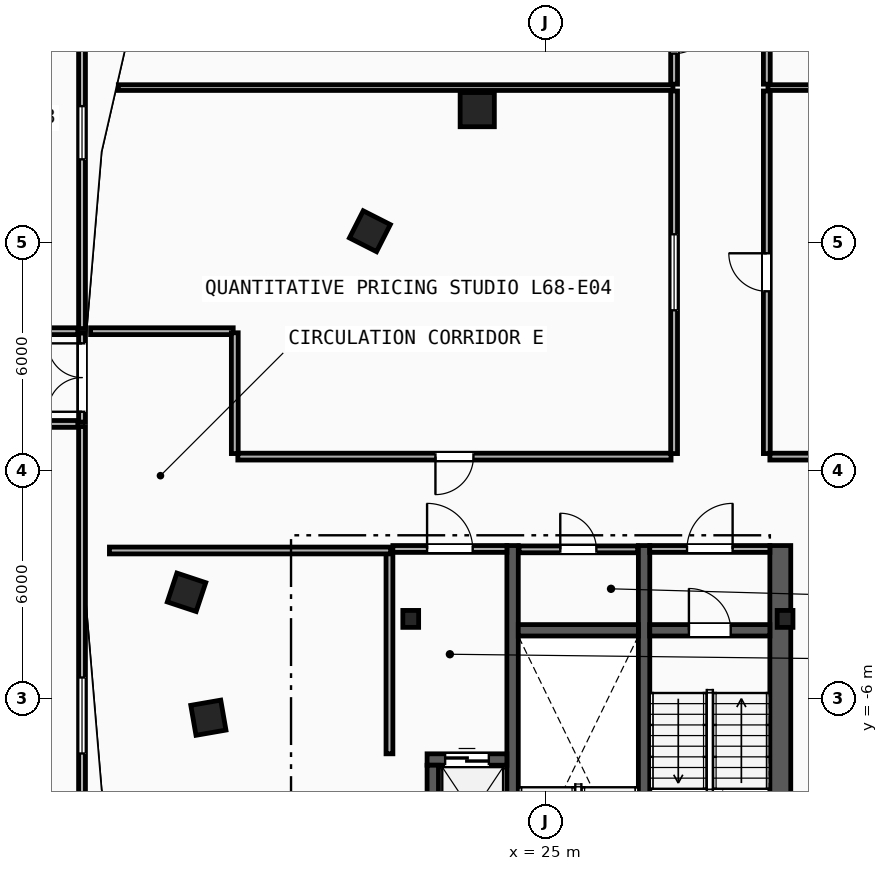
"""IFC4 building model, lengths in metres.
Left out: names, types, materials, properties, quantities, classifications, styles, units other than length and angle.
Written with IfcOpenShell. Run it as: python <this file> out.ifc"""

import sys

from ifc_helpers import new_model, si_unit, direction, frame, frame_2d, origin, origin_2d, place, context, subcontext, project, spatial, rectangle, i_section, extrude, element, fill, save


model = new_model("IFC4")
c1 = context("Model", 3, precision=1e-05, world=origin(), true_north=direction((0.0, 1.0)))
c2 = subcontext(c1, "Body", "Model", "MODEL_VIEW")
j1 = project(units=[si_unit("LENGTHUNIT", "METRE"), si_unit("PLANEANGLEUNIT", "RADIAN")], contexts=[c1])
p1 = place(None, origin())
s1 = spatial("IfcSite", under=j1, at=p1, CompositionType="ELEMENT")
p2 = place(p1, origin())
s2 = spatial("IfcBuilding", under=s1, at=p2, CompositionType="ELEMENT")
p3 = place(p2, frame((0.0, 0.0, 257.6)))
s3 = spatial("IfcBuildingStorey", under=s2, at=p3, CompositionType="ELEMENT", Elevation=257.6)
for number, where, z_axis, x_axis in (
    (1, (31.3, -3.9, 0.0), (0.0, 0.0, 1.0), (1.0, 0.0, 0.0)),
    (2, (21.45, -3.9, 0.0), (0.0, 0.0, 1.0), (1.0, 0.0, 0.0)),
):
    element("IfcColumn", number, at=place(p3, frame(where, z_axis=z_axis, x_axis=x_axis)), inside=s3, PredefinedType="COLUMN", context=c2, shape_type="SweptSolid", body=[
        extrude(i_section(OverallWidth=0.416, OverallDepth=0.446, WebThickness=0.039, FlangeThickness=0.063, FilletRadius=0.018, at=origin_2d()), origin(), (0.0, 0.0, 1.0), 3.6),
    ])
p4 = place(p3, frame((23.2, 9.5, 0.0), z_axis=(0.0, 0.0, 1.0), x_axis=(1.0, 0.0, 0.0)))
e3 = element("IfcColumn", 3, at=p4, inside=s3, PredefinedType="COLUMN", context=c2, shape_type="SweptSolid", body=[
    extrude(rectangle(XDim=0.9, YDim=0.9, at=origin_2d()), origin(), (0.0, 0.0, 1.0), 3.6),
])
for number, where, z_axis, x_axis in (
    (4, (15.55, -3.2, 0.0), (0.0, 0.0, 1.0), (-0.315, -0.949, 0.0)),
    (5, (16.125, -6.5, 0.0), (0.0, 0.0, 1.0), (0.172, -0.985, 0.0)),
    (6, (20.375, 6.3, 0.0), (0.0, 0.0, 1.0), (-0.453, -0.892, 0.0)),
):
    element("IfcColumn", number, at=place(p3, frame(where, z_axis=z_axis, x_axis=x_axis)), inside=s3, PredefinedType="COLUMN", context=c2, shape_type="SweptSolid", body=[
        extrude(rectangle(XDim=0.8, YDim=0.8, at=origin_2d()), origin(), (0.0, 0.0, 1.0), 3.6),
    ])
p5 = place(p3, frame((31.175, -15.3, 0.0), z_axis=(0.0, 0.0, 1.0), x_axis=(0.0, 1.0, 0.0)))
e7 = element("IfcWall", 7, at=p5, inside=s3, PredefinedType="SHEAR", context=c2, shape_type="SweptSolid", body=[
    extrude(rectangle(XDim=13.33, YDim=0.55, at=frame_2d((6.665, 0.0))), origin(), (0.0, 0.0, 1.0), 3.34),
])
for number, where, z_axis, x_axis in (
    (8, (27.59, -12.65, 0.0), (0.0, 0.0, 1.0), (0.0, 1.0, 0.0)),
    (9, (24.13, -12.65, 0.0), (0.0, 0.0, 1.0), (0.0, 1.0, 0.0)),
):
    element("IfcWall", number, at=place(p3, frame(where, z_axis=z_axis, x_axis=x_axis)), inside=s3, PredefinedType="SHEAR", context=c2, shape_type="SweptSolid", body=[
        extrude(rectangle(XDim=10.68, YDim=0.3, at=frame_2d((5.34, 0.0))), origin(), (0.0, 0.0, 1.0), 3.34),
    ])
p6 = place(p3, frame((27.74, -4.2, 0.0), z_axis=(0.0, 0.0, 1.0), x_axis=(1.0, 0.0, 0.0)))
e10 = element("IfcWall", 10, at=p6, inside=s3, PredefinedType="SHEAR", context=c2, shape_type="SweptSolid", body=[
    extrude(rectangle(XDim=3.16, YDim=0.3, at=frame_2d((1.58, 0.0))), origin(), (0.0, 0.0, 1.0), 3.34),
])
p7 = place(p6, frame((1.03, 0.0, 0.0)))
e11 = element("IfcOpeningElement", 11, at=p7, cuts=e10, PredefinedType="OPENING", context=c2, shape_type="SweptSolid", body=[
    extrude(rectangle(XDim=1.1, YDim=2.15, at=frame_2d((0.55, 1.075))), frame((0.0, 0.16, 0.0), z_axis=(0.0, -1.0, 0.0), x_axis=(1.0, 0.0, 0.0)), (0.0, 0.0, 1.0), 0.32),
])
p8 = place(p3, frame((24.28, -4.2, 0.0), z_axis=(0.0, 0.0, 1.0), x_axis=(1.0, 0.0, 0.0)))
e12 = element("IfcWall", 12, at=p8, inside=s3, PredefinedType="SHEAR", context=c2, shape_type="SweptSolid", body=[
    extrude(rectangle(XDim=3.16, YDim=0.3, at=frame_2d((1.58, 0.0))), origin(), (0.0, 0.0, 1.0), 3.34),
])
p9 = place(p3, frame((20.89, -7.45, 0.0), z_axis=(0.0, 0.0, 1.0), x_axis=(0.0, 1.0, 0.0)))
e13 = element("IfcWall", 13, at=p9, inside=s3, PredefinedType="PARTITIONING", context=c2, shape_type="SweptSolid", body=[
    extrude(rectangle(XDim=5.3, YDim=0.18, at=frame_2d((2.65, 0.0))), origin(), (0.0, 0.0, 1.0), 3.34),
])
p10 = place(p3, frame((20.98, -2.06, 0.0), z_axis=(0.0, 0.0, 1.0), x_axis=(1.0, 0.0, 0.0)))
e14 = element("IfcWall", 14, at=p10, inside=s3, PredefinedType="PARTITIONING", context=c2, shape_type="SweptSolid", body=[
    extrude(rectangle(XDim=3.0, YDim=0.18, at=frame_2d((1.5, 0.0))), origin(), (0.0, 0.0, 1.0), 3.34),
])
p11 = place(p10, frame((0.9, 0.0, 0.0)))
e15 = element("IfcOpeningElement", 15, at=p11, cuts=e14, PredefinedType="OPENING", context=c2, shape_type="SweptSolid", body=[
    extrude(rectangle(XDim=1.2, YDim=2.15, at=frame_2d((0.6, 1.075))), frame((0.0, 0.1, 0.0), z_axis=(0.0, -1.0, 0.0), x_axis=(1.0, 0.0, 0.0)), (0.0, 0.0, 1.0), 0.2),
])
p12 = place(p3, frame((27.74, -2.06, 0.0), z_axis=(0.0, 0.0, 1.0), x_axis=(1.0, 0.0, 0.0)))
e16 = element("IfcWall", 16, at=p12, inside=s3, PredefinedType="PARTITIONING", context=c2, shape_type="SweptSolid", body=[
    extrude(rectangle(XDim=3.16, YDim=0.18, at=frame_2d((1.58, 0.0))), origin(), (0.0, 0.0, 1.0), 3.34),
])
p13 = place(p12, frame((0.98, 0.0, 0.0)))
e17 = element("IfcOpeningElement", 17, at=p13, cuts=e16, PredefinedType="OPENING", context=c2, shape_type="SweptSolid", body=[
    extrude(rectangle(XDim=1.2, YDim=2.15, at=frame_2d((0.6, 1.075))), frame((0.0, 0.1, 0.0), z_axis=(0.0, -1.0, 0.0), x_axis=(1.0, 0.0, 0.0)), (0.0, 0.0, 1.0), 0.2),
])
p14 = place(p3, frame((21.88, -7.6, 0.0), z_axis=(0.0, 0.0, 1.0), x_axis=(1.0, 0.0, 0.0)))
e18 = element("IfcWall", 18, at=p14, inside=s3, PredefinedType="SHEAR", context=c2, shape_type="SweptSolid", body=[
    extrude(rectangle(XDim=2.1, YDim=0.3, at=frame_2d((1.05, 0.0))), origin(), (0.0, 0.0, 1.0), 3.34),
])
p15 = place(p14, frame((0.475, 0.0, 0.0)))
e19 = element("IfcOpeningElement", 19, at=p15, cuts=e18, PredefinedType="OPENING", context=c2, shape_type="SweptSolid", body=[
    extrude(rectangle(XDim=1.15, YDim=2.2, at=frame_2d((0.575, 1.1))), frame((0.0, 0.16, 0.0), z_axis=(0.0, -1.0, 0.0), x_axis=(1.0, 0.0, 0.0)), (0.0, 0.0, 1.0), 0.32),
])
p16 = place(p3, frame((22.03, -10.25, 0.0), z_axis=(0.0, 0.0, 1.0), x_axis=(0.0, 1.0, 0.0)))
e20 = element("IfcWall", 20, at=p16, inside=s3, PredefinedType="SHEAR", context=c2, shape_type="SweptSolid", body=[
    extrude(rectangle(XDim=2.5, YDim=0.3, at=frame_2d((1.25, 0.0))), origin(), (0.0, 0.0, 1.0), 3.34),
])
p17 = place(p3, frame((24.3, -2.07, 0.0), z_axis=(0.0, 0.0, 1.0), x_axis=(1.0, 0.0, 0.0)))
e21 = element("IfcWall", 21, at=p17, inside=s3, PredefinedType="PARTITIONING", context=c2, shape_type="SweptSolid", body=[
    extrude(rectangle(XDim=3.12, YDim=0.18, at=frame_2d((1.56, 0.0))), origin(), (0.0, 0.0, 1.0), 3.34),
])
p18 = place(p17, frame((1.085, 0.0, 0.0)))
e22 = element("IfcOpeningElement", 22, at=p18, cuts=e21, PredefinedType="OPENING", context=c2, shape_type="SweptSolid", body=[
    extrude(rectangle(XDim=0.95, YDim=2.1, at=frame_2d((0.475, 1.05))), frame((0.0, 0.1, 0.0), z_axis=(0.0, -1.0, 0.0), x_axis=(1.0, 0.0, 0.0)), (0.0, 0.0, 1.0), 0.2),
])
p19 = place(p3, frame((13.755, 10.08, 0.0), z_axis=(0.0, 0.0, 1.0), x_axis=(1.0, 0.0, 0.0)))
e23 = element("IfcWall", 23, at=p19, inside=s3, PredefinedType="PARTITIONING", context=c2, shape_type="SweptSolid", body=[
    extrude(rectangle(XDim=14.595, YDim=0.15, at=frame_2d((7.297, 0.0))), origin(), (0.0, 0.0, 1.0), 2.724),
])
p20 = place(p3, frame((30.85, 10.08, 0.0), z_axis=(0.0, 0.0, 1.0), x_axis=(1.0, 0.0, 0.0)))
e24 = element("IfcWall", 24, at=p20, inside=s3, PredefinedType="PARTITIONING", context=c2, shape_type="SweptSolid", body=[
    extrude(rectangle(XDim=19.395, YDim=0.15, at=frame_2d((9.697, 0.0))), origin(), (0.0, 0.0, 1.0), 2.724),
])
p21 = place(p3, frame((13.521, -2.1, 0.0), z_axis=(0.0, 0.0, 1.0), x_axis=(1.0, 0.0, 0.0)))
e25 = element("IfcWall", 25, at=p21, inside=s3, PredefinedType="PARTITIONING", context=c2, shape_type="SweptSolid", body=[
    extrude(rectangle(XDim=7.398, YDim=0.18, at=frame_2d((3.699, 0.0))), origin(), (0.0, 0.0, 1.0), 3.34),
])
p22 = place(p3, frame((30.82, 0.45, 0.0), z_axis=(0.0, 0.0, 1.0), x_axis=(0.0, 1.0, 0.0)))
e26 = element("IfcWall", 26, at=p22, inside=s3, PredefinedType="PARTITIONING", context=c2, shape_type="SweptSolid", body=[
    extrude(rectangle(XDim=9.54, YDim=0.18, at=frame_2d((4.77, 0.0))), origin(), (0.0, 0.0, 1.0), 3.34),
])
p23 = place(p22, frame((4.27, 0.0, 0.0)))
e27 = element("IfcOpeningElement", 27, at=p23, cuts=e26, PredefinedType="OPENING", context=c2, shape_type="SweptSolid", body=[
    extrude(rectangle(XDim=1.0, YDim=2.15, at=frame_2d((0.5, 1.075))), frame((0.0, 0.1, 0.0), z_axis=(0.0, -1.0, 0.0), x_axis=(1.0, 0.0, 0.0)), (0.0, 0.0, 1.0), 0.2),
])
p24 = place(p3, frame((33.628, 0.37, 0.0), z_axis=(0.0, 0.0, 1.0), x_axis=(-1.0, 0.0, 0.0)))
e28 = element("IfcWall", 28, at=p24, inside=s3, PredefinedType="PARTITIONING", context=c2, shape_type="SweptSolid", body=[
    extrude(rectangle(XDim=2.729, YDim=0.18, at=frame_2d((1.364, 0.0))), origin(), (0.0, 0.0, 1.0), 3.34),
])
p25 = place(p3, frame((28.3, 0.37, 0.0), z_axis=(0.0, 0.0, 1.0), x_axis=(-1.0, 0.0, 0.0)))
e29 = element("IfcWall", 29, at=p25, inside=s3, PredefinedType="PARTITIONING", context=c2, shape_type="SweptSolid", body=[
    extrude(rectangle(XDim=11.4, YDim=0.18, at=frame_2d((5.7, 0.0))), origin(), (0.0, 0.0, 1.0), 3.34),
])
p26 = place(p25, frame((5.2, 0.0, 0.0)))
e30 = element("IfcOpeningElement", 30, at=p26, cuts=e29, PredefinedType="OPENING", context=c2, shape_type="SweptSolid", body=[
    extrude(rectangle(XDim=1.0, YDim=2.15, at=frame_2d((0.5, 1.075))), frame((0.0, 0.1, 0.0), z_axis=(0.0, -1.0, 0.0), x_axis=(1.0, 0.0, 0.0)), (0.0, 0.0, 1.0), 0.2),
])
p27 = place(p3, frame((28.38, 9.99, 0.0), z_axis=(0.0, 0.0, 1.0), x_axis=(0.0, -1.0, 0.0)))
e31 = element("IfcWall", 31, at=p27, inside=s3, PredefinedType="PARTITIONING", context=c2, shape_type="SweptSolid", body=[
    extrude(rectangle(XDim=9.54, YDim=0.18, at=frame_2d((4.77, 0.0))), origin(), (0.0, 0.0, 1.0), 3.34),
])
p28 = place(p27, frame((3.77, 0.0, 1.05)))
e32 = element("IfcOpeningElement", 32, at=p28, cuts=e31, PredefinedType="OPENING", context=c2, shape_type="SweptSolid", body=[
    extrude(rectangle(XDim=2.0, YDim=1.5, at=frame_2d((1.0, 0.75))), frame((0.0, 0.1, 0.0), z_axis=(0.0, -1.0, 0.0), x_axis=(1.0, 0.0, 0.0)), (0.0, 0.0, 1.0), 0.2),
])
p29 = place(p3, frame((16.779, 3.67, 0.0), z_axis=(0.0, 0.0, 1.0), x_axis=(-1.0, 0.0, 0.0)))
e33 = element("IfcWall", 33, at=p29, inside=s3, PredefinedType="PARTITIONING", context=c2, shape_type="SweptSolid", body=[
    extrude(rectangle(XDim=3.753, YDim=0.18, at=frame_2d((1.876, 0.0))), origin(), (0.0, 0.0, 1.0), 3.34),
])
p30 = place(p3, frame((16.82, 0.45, 0.0), z_axis=(0.0, 0.0, 1.0), x_axis=(0.0, 1.0, 0.0)))
e34 = element("IfcWall", 34, at=p30, inside=s3, PredefinedType="PARTITIONING", context=c2, shape_type="SweptSolid", body=[
    extrude(rectangle(XDim=3.178, YDim=0.18, at=frame_2d((1.589, 0.0))), origin(), (0.0, 0.0, 1.0), 3.34),
])
p31 = place(p3, frame((28.38, 12.779, 0.0), z_axis=(0.0, 0.0, 1.0), x_axis=(0.0, -1.0, 0.0)))
e35 = element("IfcWall", 35, at=p31, inside=s3, PredefinedType="PARTITIONING", context=c2, shape_type="SweptSolid", body=[
    extrude(rectangle(XDim=2.609, YDim=0.18, at=frame_2d((1.304, 0.0))), origin(), (0.0, 0.0, 1.0), 3.34),
])
p32 = place(p31, frame((0.804, 0.0, 0.0)))
e36 = element("IfcOpeningElement", 36, at=p32, cuts=e35, PredefinedType="OPENING", context=c2, shape_type="SweptSolid", body=[
    extrude(rectangle(XDim=1.0, YDim=2.15, at=frame_2d((0.5, 1.075))), frame((0.0, 0.1, 0.0), z_axis=(0.0, -1.0, 0.0), x_axis=(1.0, 0.0, 0.0)), (0.0, 0.0, 1.0), 0.2),
])
p33 = place(p3, frame((30.82, 10.17, 0.0), z_axis=(0.0, 0.0, 1.0), x_axis=(0.0, 1.0, 0.0)))
e37 = element("IfcWall", 37, at=p33, inside=s3, PredefinedType="PARTITIONING", context=c2, shape_type="SweptSolid", body=[
    extrude(rectangle(XDim=2.609, YDim=0.18, at=frame_2d((1.304, 0.0))), origin(), (0.0, 0.0, 1.0), 3.34),
])
p34 = place(p3, frame((3.895, 1.23, 0.0), z_axis=(0.0, 0.0, 1.0), x_axis=(1.0, 0.0, 0.0)))
e38 = element("IfcWall", 38, at=p34, inside=s3, PredefinedType="PARTITIONING", context=c2, shape_type="SweptSolid", body=[
    extrude(rectangle(XDim=8.793, YDim=0.18, at=frame_2d((4.397, 0.0))), origin(), (0.0, 0.0, 1.0), 3.34),
])
p35 = place(p34, frame((3.597, 0.0, 0.0)))
e39 = element("IfcOpeningElement", 39, at=p35, cuts=e38, PredefinedType="OPENING", context=c2, shape_type="SweptSolid", body=[
    extrude(rectangle(XDim=1.6, YDim=2.2, at=frame_2d((0.8, 1.1))), frame((0.0, 0.1, 0.0), z_axis=(0.0, -1.0, 0.0), x_axis=(1.0, 0.0, 0.0)), (0.0, 0.0, 1.0), 0.2),
])
p36 = place(p3, frame((12.688, 3.67, 0.0), z_axis=(0.0, 0.0, 1.0), x_axis=(-1.0, 0.0, 0.0)))
e40 = element("IfcWall", 40, at=p36, inside=s3, PredefinedType="PARTITIONING", context=c2, shape_type="SweptSolid", body=[
    extrude(rectangle(XDim=8.793, YDim=0.18, at=frame_2d((4.397, 0.0))), origin(), (0.0, 0.0, 1.0), 3.34),
])
p37 = place(p36, frame((3.597, 0.0, 0.0)))
e41 = element("IfcOpeningElement", 41, at=p37, cuts=e40, PredefinedType="OPENING", context=c2, shape_type="SweptSolid", body=[
    extrude(rectangle(XDim=1.6, YDim=2.2, at=frame_2d((0.8, 1.1))), frame((0.0, 0.1, 0.0), z_axis=(0.0, -1.0, 0.0), x_axis=(1.0, 0.0, 0.0)), (0.0, 0.0, 1.0), 0.2),
])
p38 = place(p3, frame((12.8, -14.044, 0.0), z_axis=(0.0, 0.0, 1.0), x_axis=(0.0, 1.0, 0.0)))
e42 = element("IfcWall", 42, at=p38, inside=s3, PredefinedType="PARTITIONING", context=c2, shape_type="SweptSolid", body=[
    extrude(rectangle(XDim=15.204, YDim=0.18, at=frame_2d((7.602, 0.0))), origin(), (0.0, 0.0, 1.0), 3.34),
])
p39 = place(p38, frame((6.602, 0.0, 1.05)))
e43 = element("IfcOpeningElement", 43, at=p39, cuts=e42, PredefinedType="OPENING", context=c2, shape_type="SweptSolid", body=[
    extrude(rectangle(XDim=2.0, YDim=1.5, at=frame_2d((1.0, 0.75))), frame((0.0, 0.1, 0.0), z_axis=(0.0, -1.0, 0.0), x_axis=(1.0, 0.0, 0.0)), (0.0, 0.0, 1.0), 0.2),
])
p40 = place(p3, frame((12.8, 3.74, 0.0), z_axis=(0.0, 0.0, 1.0), x_axis=(0.0, 1.0, 0.0)))
e44 = element("IfcWall", 44, at=p40, inside=s3, PredefinedType="PARTITIONING", context=c2, shape_type="SweptSolid", body=[
    extrude(rectangle(XDim=10.304, YDim=0.18, at=frame_2d((5.152, 0.0))), origin(), (0.0, 0.0, 1.0), 3.34),
])
p41 = place(p40, frame((4.452, 0.0, 1.05)))
e45 = element("IfcOpeningElement", 45, at=p41, cuts=e44, PredefinedType="OPENING", context=c2, shape_type="SweptSolid", body=[
    extrude(rectangle(XDim=1.4, YDim=1.5, at=frame_2d((0.7, 0.75))), frame((0.0, 0.1, 0.0), z_axis=(0.0, -1.0, 0.0), x_axis=(1.0, 0.0, 0.0)), (0.0, 0.0, 1.0), 0.2),
])
p42 = place(p3, frame((12.8, 1.28, 0.0), z_axis=(0.0, 0.0, 1.0), x_axis=(0.0, 1.0, 0.0)))
e46 = element("IfcWall", 46, at=p42, inside=s3, PredefinedType="PARTITIONING", context=c2, shape_type="SweptSolid", body=[
    extrude(rectangle(XDim=2.34, YDim=0.18, at=frame_2d((1.17, 0.0))), origin(), (0.0, 0.0, 1.0), 3.34),
])
p43 = place(p42, frame((0.27, 0.0, 0.0)))
e47 = element("IfcOpeningElement", 47, at=p43, cuts=e46, PredefinedType="OPENING", context=c2, shape_type="SweptSolid", body=[
    extrude(rectangle(XDim=1.8, YDim=2.25, at=frame_2d((0.9, 1.125))), frame((0.0, 0.1, 0.0), z_axis=(0.0, -1.0, 0.0), x_axis=(1.0, 0.0, 0.0)), (0.0, 0.0, 1.0), 0.2),
])
p44 = place(p7, origin())
e48 = element("IfcDoor", 48, at=p44, inside=s3, OperationType="SINGLE_SWING_LEFT", PredefinedType="DOOR", context=c2, shape_type="SweptSolid", body=[
    extrude(rectangle(XDim=1.1, YDim=2.15, at=frame_2d((0.55, 1.075))), frame((0.0, 0.025, 0.0), z_axis=(0.0, -1.0, 0.0), x_axis=(1.0, 0.0, 0.0)), (0.0, 0.0, 1.0), 0.05),
])
fill(e11, e48)
p45 = place(p11, origin())
e49 = element("IfcDoor", 49, at=p45, inside=s3, OperationType="SINGLE_SWING_LEFT", PredefinedType="DOOR", context=c2, shape_type="SweptSolid", body=[
    extrude(rectangle(XDim=1.2, YDim=2.15, at=frame_2d((0.6, 1.075))), frame((0.0, 0.025, 0.0), z_axis=(0.0, -1.0, 0.0), x_axis=(1.0, 0.0, 0.0)), (0.0, 0.0, 1.0), 0.05),
])
fill(e15, e49)
p46 = place(p13, origin())
e50 = element("IfcDoor", 50, at=p46, inside=s3, OperationType="SINGLE_SWING_RIGHT", PredefinedType="DOOR", context=c2, shape_type="SweptSolid", body=[
    extrude(rectangle(XDim=1.2, YDim=2.15, at=frame_2d((0.6, 1.075))), frame((0.0, 0.025, 0.0), z_axis=(0.0, -1.0, 0.0), x_axis=(1.0, 0.0, 0.0)), (0.0, 0.0, 1.0), 0.05),
])
fill(e17, e50)
p47 = place(p15, origin())
e51 = element("IfcDoor", 51, at=p47, inside=s3, OperationType="SLIDING_TO_LEFT", PredefinedType="TRAPDOOR", context=c2, shape_type="SweptSolid", body=[
    extrude(rectangle(XDim=1.15, YDim=2.2, at=frame_2d((0.575, 1.1))), frame((0.0, 0.025, 0.0), z_axis=(0.0, -1.0, 0.0), x_axis=(1.0, 0.0, 0.0)), (0.0, 0.0, 1.0), 0.05),
])
fill(e19, e51)
p48 = place(p26, origin())
e52 = element("IfcDoor", 52, at=p48, inside=s3, OperationType="SINGLE_SWING_RIGHT", PredefinedType="DOOR", context=c2, shape_type="SweptSolid", body=[
    extrude(rectangle(XDim=1.0, YDim=2.15, at=frame_2d((0.5, 1.075))), frame((0.0, 0.025, 0.0), z_axis=(0.0, -1.0, 0.0), x_axis=(1.0, 0.0, 0.0)), (0.0, 0.0, 1.0), 0.05),
])
fill(e30, e52)
p49 = place(p23, origin())
e53 = element("IfcDoor", 53, at=p49, inside=s3, OperationType="SINGLE_SWING_RIGHT", PredefinedType="DOOR", context=c2, shape_type="SweptSolid", body=[
    extrude(rectangle(XDim=1.0, YDim=2.15, at=frame_2d((0.5, 1.075))), frame((0.0, 0.025, 0.0), z_axis=(0.0, -1.0, 0.0), x_axis=(1.0, 0.0, 0.0)), (0.0, 0.0, 1.0), 0.05),
])
fill(e27, e53)
p50 = place(p18, origin())
e54 = element("IfcDoor", 54, at=p50, inside=s3, OperationType="SINGLE_SWING_LEFT", PredefinedType="DOOR", context=c2, shape_type="SweptSolid", body=[
    extrude(rectangle(XDim=0.95, YDim=2.1, at=frame_2d((0.475, 1.05))), frame((0.0, 0.025, 0.0), z_axis=(0.0, -1.0, 0.0), x_axis=(1.0, 0.0, 0.0)), (0.0, 0.0, 1.0), 0.05),
])
fill(e22, e54)
p51 = place(p32, origin())
e55 = element("IfcDoor", 55, at=p51, inside=s3, OperationType="SINGLE_SWING_LEFT", PredefinedType="DOOR", context=c2, shape_type="SweptSolid", body=[
    extrude(rectangle(XDim=1.0, YDim=2.15, at=frame_2d((0.5, 1.075))), frame((0.0, 0.025, 0.0), z_axis=(0.0, -1.0, 0.0), x_axis=(1.0, 0.0, 0.0)), (0.0, 0.0, 1.0), 0.05),
])
fill(e36, e55)
p52 = place(p43, origin())
e56 = element("IfcDoor", 56, at=p52, inside=s3, OperationType="DOUBLE_DOOR_SINGLE_SWING", PredefinedType="DOOR", context=c2, shape_type="SweptSolid", body=[
    extrude(rectangle(XDim=1.8, YDim=2.25, at=frame_2d((0.9, 1.125))), frame((0.0, 0.025, 0.0), z_axis=(0.0, -1.0, 0.0), x_axis=(1.0, 0.0, 0.0)), (0.0, 0.0, 1.0), 0.05),
])
fill(e47, e56)
p53 = place(p28, origin())
e57 = element("IfcWindow", 57, at=p53, inside=s3, PartitioningType="SINGLE_PANEL", PredefinedType="WINDOW", context=c2, shape_type="SweptSolid", body=[
    extrude(rectangle(XDim=2.0, YDim=1.5, at=frame_2d((1.0, 0.75))), frame((0.0, 0.03, 0.0), z_axis=(0.0, -1.0, 0.0), x_axis=(1.0, 0.0, 0.0)), (0.0, 0.0, 1.0), 0.06),
])
fill(e32, e57)
p54 = place(p39, origin())
e58 = element("IfcWindow", 58, at=p54, inside=s3, PartitioningType="SINGLE_PANEL", PredefinedType="WINDOW", context=c2, shape_type="SweptSolid", body=[
    extrude(rectangle(XDim=2.0, YDim=1.5, at=frame_2d((1.0, 0.75))), frame((0.0, 0.03, 0.0), z_axis=(0.0, -1.0, 0.0), x_axis=(1.0, 0.0, 0.0)), (0.0, 0.0, 1.0), 0.06),
])
fill(e43, e58)
p55 = place(p41, origin())
e59 = element("IfcWindow", 59, at=p55, inside=s3, PartitioningType="SINGLE_PANEL", PredefinedType="WINDOW", context=c2, shape_type="SweptSolid", body=[
    extrude(rectangle(XDim=1.4, YDim=1.5, at=frame_2d((0.7, 0.75))), frame((0.0, 0.03, 0.0), z_axis=(0.0, -1.0, 0.0), x_axis=(1.0, 0.0, 0.0)), (0.0, 0.0, 1.0), 0.06),
])
fill(e45, e59)
save(model, sys.argv[1])
